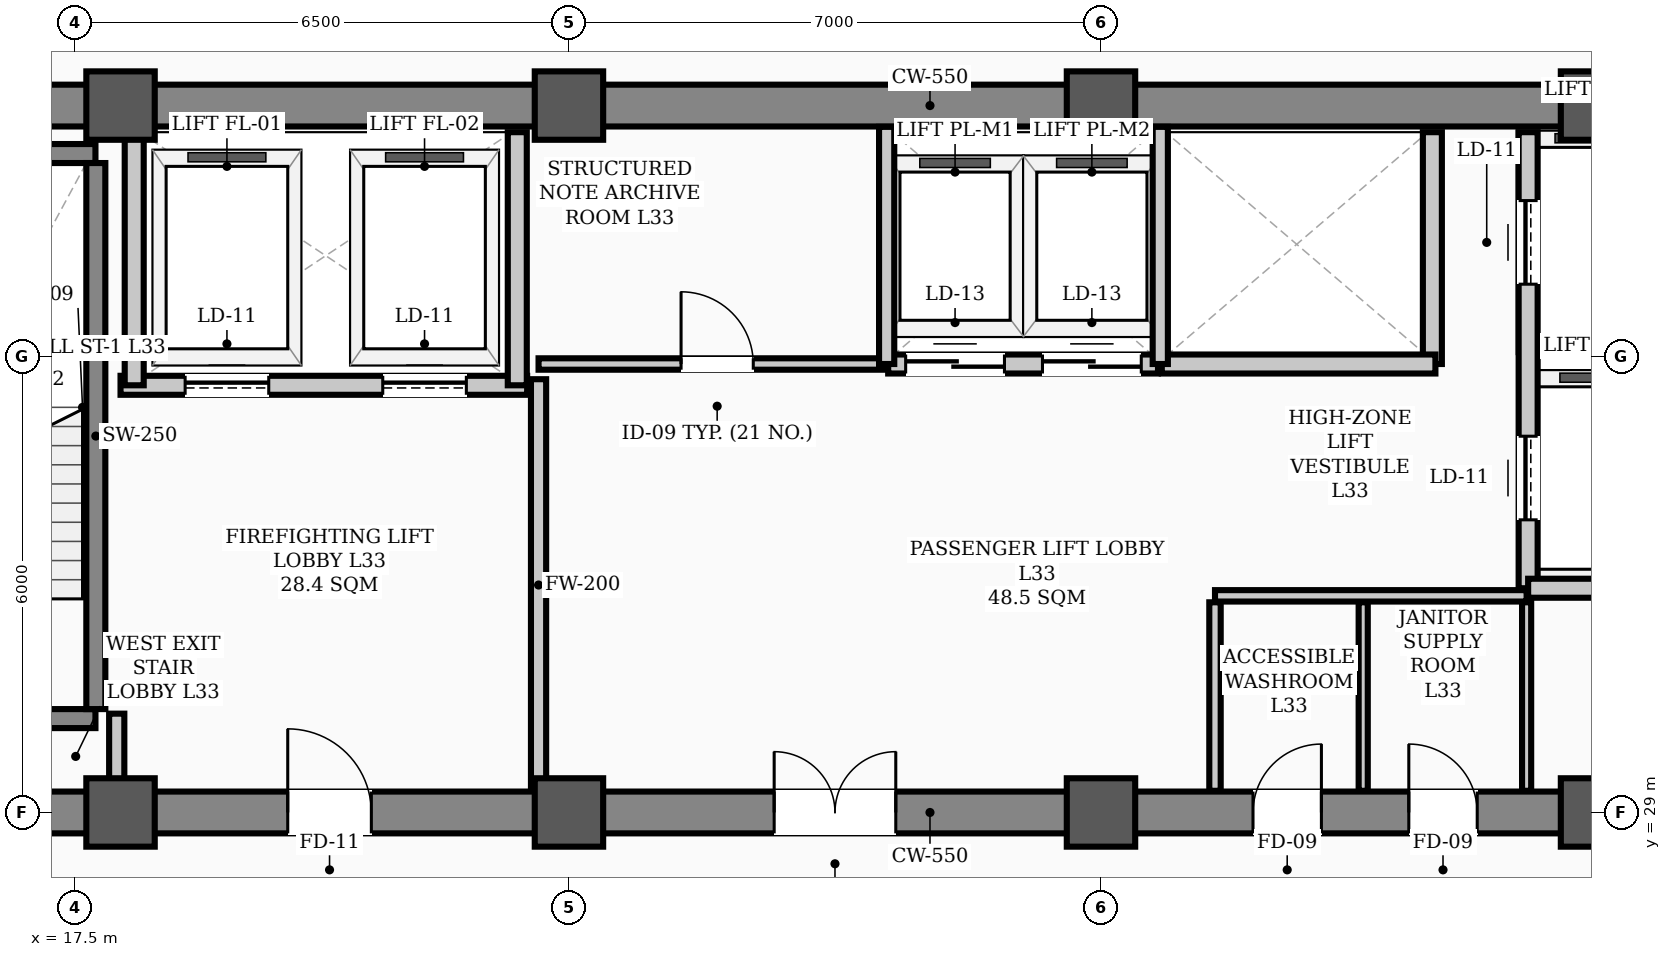
"""IFC4 building model, lengths in metres.
Left out: names, types, materials, properties, quantities, classifications, styles, units other than length and angle.
Written with IfcOpenShell. Run it as: python <this file> out.ifc"""

import sys

from ifc_helpers import new_model, si_unit, direction, frame, frame_2d, origin, origin_2d, place, context, subcontext, project, spatial, rectangle, hollow_rectangle, extrude, element, fill, save


model = new_model("IFC4")
c1 = context("Model", 3, precision=1e-05, world=origin(), true_north=direction((0.0, 1.0)))
c2 = subcontext(c1, "Body", "Model", "MODEL_VIEW")
j1 = project(units=[si_unit("LENGTHUNIT", "METRE"), si_unit("PLANEANGLEUNIT", "RADIAN")], contexts=[c1])
p1 = place(None, origin())
s1 = spatial("IfcSite", under=j1, at=p1, CompositionType="ELEMENT")
p2 = place(p1, origin())
s2 = spatial("IfcBuilding", under=s1, at=p2, CompositionType="ELEMENT")
p3 = place(p2, frame((0.0, 0.0, 134.4)))
s3 = spatial("IfcBuildingStorey", under=s2, at=p3, CompositionType="ELEMENT", Elevation=134.4)
for number, where, z_axis, x_axis in (
    (1, (18.1, 29.0, 0.0), (0.0, 0.0, 1.0), (1.0, 0.0, 0.0)),
    (2, (18.1, 38.3, 0.0), (0.0, 0.0, 1.0), (1.0, 0.0, 0.0)),
    (3, (24.0, 29.0, 0.0), (0.0, 0.0, 1.0), (1.0, 0.0, 0.0)),
    (4, (24.0, 38.3, 0.0), (0.0, 0.0, 1.0), (1.0, 0.0, 0.0)),
    (5, (31.0, 29.0, 0.0), (0.0, 0.0, 1.0), (1.0, 0.0, 0.0)),
    (6, (31.0, 38.3, 0.0), (0.0, 0.0, 1.0), (1.0, 0.0, 0.0)),
    (7, (37.5, 29.0, 0.0), (0.0, 0.0, 1.0), (1.0, 0.0, 0.0)),
    (8, (37.5, 38.3, 0.0), (0.0, 0.0, 1.0), (1.0, 0.0, 0.0)),
):
    element("IfcColumn", number, at=place(p3, frame(where, z_axis=z_axis, x_axis=x_axis)), inside=s3, PredefinedType="COLUMN", context=c2, shape_type="SweptSolid", body=[
        extrude(hollow_rectangle(XDim=0.9, YDim=0.9, WallThickness=0.035, InnerFilletRadius=0.017, OuterFilletRadius=0.052, at=origin_2d()), origin(), (0.0, 0.0, 1.0), 3.9),
    ])
p4 = place(p3, frame((13.5, 29.0, 0.0), z_axis=(0.0, 0.0, 1.0), x_axis=(1.0, 0.0, 0.0)))
e9 = element("IfcWall", 9, at=p4, inside=s3, PredefinedType="SHEAR", context=c2, shape_type="SweptSolid", body=[
    extrude(rectangle(XDim=30.5, YDim=0.55, at=frame_2d((15.25, 0.0))), origin(), (0.0, 0.0, 1.0), 3.72),
])
p5 = place(p4, frame((1.75, 0.0, 0.0)))
e10 = element("IfcOpeningElement", 10, at=p5, cuts=e9, PredefinedType="OPENING", context=c2, shape_type="SweptSolid", body=[
    extrude(rectangle(XDim=1.1, YDim=2.08, at=frame_2d((0.55, 1.04))), frame((0.0, 0.285, 0.0), z_axis=(0.0, -1.0, 0.0), x_axis=(1.0, 0.0, 0.0)), (0.0, 0.0, 1.0), 0.57),
])
p6 = place(p4, frame((26.7, 0.0, 0.0)))
e11 = element("IfcOpeningElement", 11, at=p6, cuts=e9, PredefinedType="OPENING", context=c2, shape_type="SweptSolid", body=[
    extrude(rectangle(XDim=1.1, YDim=2.08, at=frame_2d((0.55, 1.04))), frame((0.0, 0.285, 0.0), z_axis=(0.0, -1.0, 0.0), x_axis=(1.0, 0.0, 0.0)), (0.0, 0.0, 1.0), 0.57),
])
p7 = place(p4, frame((6.8, 0.0, 0.0)))
e12 = element("IfcOpeningElement", 12, at=p7, cuts=e9, PredefinedType="OPENING", context=c2, shape_type="SweptSolid", body=[
    extrude(rectangle(XDim=1.1, YDim=2.08, at=frame_2d((0.55, 1.04))), frame((0.0, 0.285, 0.0), z_axis=(0.0, -1.0, 0.0), x_axis=(1.0, 0.0, 0.0)), (0.0, 0.0, 1.0), 0.57),
])
p8 = place(p4, frame((13.2, 0.0, 0.0)))
e13 = element("IfcOpeningElement", 13, at=p8, cuts=e9, PredefinedType="OPENING", context=c2, shape_type="SweptSolid", body=[
    extrude(rectangle(XDim=1.6, YDim=2.08, at=frame_2d((0.8, 1.04))), frame((0.0, 0.285, 0.0), z_axis=(0.0, -1.0, 0.0), x_axis=(1.0, 0.0, 0.0)), (0.0, 0.0, 1.0), 0.57),
])
p9 = place(p4, frame((19.5, 0.0, 0.0)))
e14 = element("IfcOpeningElement", 14, at=p9, cuts=e9, PredefinedType="OPENING", context=c2, shape_type="SweptSolid", body=[
    extrude(rectangle(XDim=0.9, YDim=2.08, at=frame_2d((0.45, 1.04))), frame((0.0, 0.285, 0.0), z_axis=(0.0, -1.0, 0.0), x_axis=(1.0, 0.0, 0.0)), (0.0, 0.0, 1.0), 0.57),
])
p10 = place(p4, frame((21.55, 0.0, 0.0)))
e15 = element("IfcOpeningElement", 15, at=p10, cuts=e9, PredefinedType="OPENING", context=c2, shape_type="SweptSolid", body=[
    extrude(rectangle(XDim=0.9, YDim=2.08, at=frame_2d((0.45, 1.04))), frame((0.0, 0.285, 0.0), z_axis=(0.0, -1.0, 0.0), x_axis=(1.0, 0.0, 0.0)), (0.0, 0.0, 1.0), 0.57),
])
p11 = place(p3, frame((13.5, 38.3, 0.0), z_axis=(0.0, 0.0, 1.0), x_axis=(1.0, 0.0, 0.0)))
e16 = element("IfcWall", 16, at=p11, inside=s3, PredefinedType="SHEAR", context=c2, shape_type="SweptSolid", body=[
    extrude(rectangle(XDim=30.5, YDim=0.55, at=frame_2d((15.25, 0.0))), origin(), (0.0, 0.0, 1.0), 3.72),
])
p12 = place(p3, frame((14.43, 30.235, 0.0), z_axis=(0.0, 0.0, 1.0), x_axis=(1.0, 0.0, 0.0)))
e17 = element("IfcWall", 17, at=p12, inside=s3, PredefinedType="STANDARD", context=c2, shape_type="SweptSolid", body=[
    extrude(rectangle(XDim=3.34, YDim=0.25, at=frame_2d((1.67, 0.0))), origin(), (0.0, 0.0, 1.0), 3.72),
])
p13 = place(p12, frame((1.1, 0.0, 0.0)))
e18 = element("IfcOpeningElement", 18, at=p13, cuts=e17, PredefinedType="OPENING", context=c2, shape_type="SweptSolid", body=[
    extrude(rectangle(XDim=1.1, YDim=2.08, at=frame_2d((0.55, 1.04))), frame((0.0, 0.135, 0.0), z_axis=(0.0, -1.0, 0.0), x_axis=(1.0, 0.0, 0.0)), (0.0, 0.0, 1.0), 0.27),
])
p14 = place(p3, frame((14.43, 37.669, 0.0), z_axis=(0.0, 0.0, 1.0), x_axis=(1.0, 0.0, 0.0)))
e19 = element("IfcWall", 19, at=p14, inside=s3, PredefinedType="STANDARD", context=c2, shape_type="SweptSolid", body=[
    extrude(rectangle(XDim=3.34, YDim=0.25, at=frame_2d((1.67, 0.0))), origin(), (0.0, 0.0, 1.0), 3.72),
])
p15 = place(p3, frame((17.775, 30.36, 0.0), z_axis=(0.0, 0.0, 1.0), x_axis=(0.0, 1.0, 0.0)))
e20 = element("IfcWall", 20, at=p15, inside=s3, PredefinedType="STANDARD", context=c2, shape_type="SweptSolid", body=[
    extrude(rectangle(XDim=7.184, YDim=0.25, at=frame_2d((3.592, 0.0))), origin(), (0.0, 0.0, 1.0), 3.72),
])
p16 = place(p3, frame((18.1, 34.62, 0.0), z_axis=(0.0, 0.0, 1.0), x_axis=(1.0, 0.0, 0.0)))
e21 = element("IfcWall", 21, at=p16, inside=s3, PredefinedType="STANDARD", context=c2, shape_type="SweptSolid", body=[
    extrude(rectangle(XDim=5.35, YDim=0.25, at=frame_2d((2.675, 0.0))), origin(), (0.0, 0.0, 1.0), 3.72),
])
p17 = place(p16, frame((0.85, 0.0, 0.0)))
e22 = element("IfcOpeningElement", 22, at=p17, cuts=e21, PredefinedType="OPENING", context=c2, shape_type="SweptSolid", body=[
    extrude(rectangle(XDim=1.1, YDim=2.08, at=frame_2d((0.55, 1.04))), frame((0.0, 0.135, 0.0), z_axis=(0.0, -1.0, 0.0), x_axis=(1.0, 0.0, 0.0)), (0.0, 0.0, 1.0), 0.27),
])
p18 = place(p16, frame((3.45, 0.0, 0.0)))
e23 = element("IfcOpeningElement", 23, at=p18, cuts=e21, PredefinedType="OPENING", context=c2, shape_type="SweptSolid", body=[
    extrude(rectangle(XDim=1.1, YDim=2.08, at=frame_2d((0.55, 1.04))), frame((0.0, 0.135, 0.0), z_axis=(0.0, -1.0, 0.0), x_axis=(1.0, 0.0, 0.0)), (0.0, 0.0, 1.0), 0.27),
])
p19 = place(p3, frame((36.62, 31.95, 0.0), z_axis=(0.0, 0.0, 1.0), x_axis=(0.0, 1.0, 0.0)))
e24 = element("IfcWall", 24, at=p19, inside=s3, PredefinedType="STANDARD", context=c2, shape_type="SweptSolid", body=[
    extrude(rectangle(XDim=6.0, YDim=0.25, at=frame_2d((3.0, 0.0))), origin(), (0.0, 0.0, 1.0), 3.72),
])
p20 = place(p19, frame((0.9, 0.0, 0.0)))
e25 = element("IfcOpeningElement", 25, at=p20, cuts=e24, PredefinedType="OPENING", context=c2, shape_type="SweptSolid", body=[
    extrude(rectangle(XDim=1.1, YDim=2.08, at=frame_2d((0.55, 1.04))), frame((0.0, 0.135, 0.0), z_axis=(0.0, -1.0, 0.0), x_axis=(1.0, 0.0, 0.0)), (0.0, 0.0, 1.0), 0.27),
])
p21 = place(p19, frame((4.0, 0.0, 0.0)))
e26 = element("IfcOpeningElement", 26, at=p21, cuts=e24, PredefinedType="OPENING", context=c2, shape_type="SweptSolid", body=[
    extrude(rectangle(XDim=1.1, YDim=2.08, at=frame_2d((0.55, 1.04))), frame((0.0, 0.135, 0.0), z_axis=(0.0, -1.0, 0.0), x_axis=(1.0, 0.0, 0.0)), (0.0, 0.0, 1.0), 0.27),
])
p22 = place(p3, frame((36.62, 31.95, 0.0), z_axis=(0.0, 0.0, 1.0), x_axis=(1.0, 0.0, 0.0)))
e27 = element("IfcWall", 27, at=p22, inside=s3, PredefinedType="STANDARD", context=c2, shape_type="SweptSolid", body=[
    extrude(rectangle(XDim=1.9, YDim=0.25, at=frame_2d((0.95, 0.0))), origin(), (0.0, 0.0, 1.0), 3.48),
])
for number, where, z_axis, x_axis in (
    (28, (18.28, 34.62, 0.0), (0.0, 0.0, 1.0), (0.0, 1.0, 0.0)),
    (29, (23.32, 34.62, 0.0), (0.0, 0.0, 1.0), (0.0, 1.0, 0.0)),
):
    element("IfcWall", number, at=place(p3, frame(where, z_axis=z_axis, x_axis=x_axis)), inside=s3, PredefinedType="STANDARD", context=c2, shape_type="SweptSolid", body=[
        extrude(rectangle(XDim=3.33, YDim=0.25, at=frame_2d((1.665, 0.0))), origin(), (0.0, 0.0, 1.0), 3.72),
    ])
p23 = place(p3, frame((35.36, 34.9, 0.0), z_axis=(0.0, 0.0, 1.0), x_axis=(0.0, 1.0, 0.0)))
e30 = element("IfcWall", 30, at=p23, inside=s3, PredefinedType="STANDARD", context=c2, shape_type="SweptSolid", body=[
    extrude(rectangle(XDim=3.05, YDim=0.25, at=frame_2d((1.525, 0.0))), origin(), (0.0, 0.0, 1.0), 3.72),
])
p24 = place(p3, frame((28.2, 34.9, 0.0), z_axis=(0.0, 0.0, 1.0), x_axis=(1.0, 0.0, 0.0)))
e31 = element("IfcWall", 31, at=p24, inside=s3, PredefinedType="STANDARD", context=c2, shape_type="SweptSolid", body=[
    extrude(rectangle(XDim=3.55, YDim=0.25, at=frame_2d((1.775, 0.0))), origin(), (0.0, 0.0, 1.0), 3.72),
])
p25 = place(p24, frame((0.23, 0.0, 0.0)))
e32 = element("IfcOpeningElement", 32, at=p25, cuts=e31, PredefinedType="OPENING", context=c2, shape_type="SweptSolid", body=[
    extrude(rectangle(XDim=1.3, YDim=2.08, at=frame_2d((0.65, 1.04))), frame((0.0, 0.135, 0.0), z_axis=(0.0, -1.0, 0.0), x_axis=(1.0, 0.0, 0.0)), (0.0, 0.0, 1.0), 0.27),
])
p26 = place(p24, frame((2.03, 0.0, 0.0)))
e33 = element("IfcOpeningElement", 33, at=p26, cuts=e31, PredefinedType="OPENING", context=c2, shape_type="SweptSolid", body=[
    extrude(rectangle(XDim=1.3, YDim=2.08, at=frame_2d((0.65, 1.04))), frame((0.0, 0.135, 0.0), z_axis=(0.0, -1.0, 0.0), x_axis=(1.0, 0.0, 0.0)), (0.0, 0.0, 1.0), 0.27),
])
p27 = place(p3, frame((31.8, 34.9, 0.0), z_axis=(0.0, 0.0, 1.0), x_axis=(1.0, 0.0, 0.0)))
e34 = element("IfcWall", 34, at=p27, inside=s3, PredefinedType="STANDARD", context=c2, shape_type="SweptSolid", body=[
    extrude(rectangle(XDim=3.6, YDim=0.25, at=frame_2d((1.8, 0.0))), origin(), (0.0, 0.0, 1.0), 3.72),
])
p28 = place(p3, frame((23.6, 34.9, 0.0), z_axis=(0.0, 0.0, 1.0), x_axis=(1.0, 0.0, 0.0)))
e35 = element("IfcWall", 35, at=p28, inside=s3, PredefinedType="PARTITIONING", context=c2, shape_type="SweptSolid", body=[
    extrude(rectangle(XDim=4.58, YDim=0.15, at=frame_2d((2.29, 0.0))), origin(), (0.0, 0.0, 1.0), 3.72),
])
p29 = place(p28, frame((1.875, 0.0, 0.0)))
e36 = element("IfcOpeningElement", 36, at=p29, cuts=e35, PredefinedType="OPENING", context=c2, shape_type="SweptSolid", body=[
    extrude(rectangle(XDim=0.95, YDim=2.08, at=frame_2d((0.475, 1.04))), frame((0.0, 0.085, 0.0), z_axis=(0.0, -1.0, 0.0), x_axis=(1.0, 0.0, 0.0)), (0.0, 0.0, 1.0), 0.17),
])
p30 = place(p3, frame((32.5, 31.85, 0.0), z_axis=(0.0, 0.0, 1.0), x_axis=(1.0, 0.0, 0.0)))
e37 = element("IfcWall", 37, at=p30, inside=s3, PredefinedType="PARTITIONING", context=c2, shape_type="SweptSolid", body=[
    extrude(rectangle(XDim=4.1, YDim=0.15, at=frame_2d((2.05, 0.0))), origin(), (0.0, 0.0, 1.0), 3.72),
])
p31 = place(p3, frame((18.05, 29.285, 0.0), z_axis=(0.0, 0.0, 1.0), x_axis=(0.0, 1.0, 0.0)))
e38 = element("IfcWall", 38, at=p31, inside=s3, PredefinedType="STANDARD", context=c2, shape_type="SweptSolid", body=[
    extrude(rectangle(XDim=1.015, YDim=0.2, at=frame_2d((0.508, 0.0))), origin(), (0.0, 0.0, 1.0), 3.3),
])
p32 = place(p3, frame((23.6, 29.285, 0.0), z_axis=(0.0, 0.0, 1.0), x_axis=(0.0, 1.0, 0.0)))
e39 = element("IfcWall", 39, at=p32, inside=s3, PredefinedType="STANDARD", context=c2, shape_type="SweptSolid", body=[
    extrude(rectangle(XDim=5.415, YDim=0.2, at=frame_2d((2.708, 0.0))), origin(), (0.0, 0.0, 1.0), 3.1),
])
p33 = place(p3, frame((32.5, 29.285, 0.0), z_axis=(0.0, 0.0, 1.0), x_axis=(0.0, 1.0, 0.0)))
e40 = element("IfcWall", 40, at=p33, inside=s3, PredefinedType="PARTITIONING", context=c2, shape_type="SweptSolid", body=[
    extrude(rectangle(XDim=2.48, YDim=0.15, at=frame_2d((1.24, 0.0))), origin(), (0.0, 0.0, 1.0), 3.3),
])
for number, where, z_axis, x_axis in (
    (41, (36.6, 29.285, 0.0), (0.0, 0.0, 1.0), (0.0, 1.0, 0.0)),
    (42, (34.45, 29.285, 0.0), (0.0, 0.0, 1.0), (0.0, 1.0, 0.0)),
):
    element("IfcWall", number, at=place(p3, frame(where, z_axis=z_axis, x_axis=x_axis)), inside=s3, PredefinedType="PARTITIONING", context=c2, shape_type="SweptSolid", body=[
        extrude(rectangle(XDim=2.48, YDim=0.12, at=frame_2d((1.24, 0.0))), origin(), (0.0, 0.0, 1.0), 3.3),
    ])
for number, where, z_axis, x_axis in (
    (43, (28.18, 34.9, 0.0), (0.0, 0.0, 1.0), (0.0, 1.0, 0.0)),
    (44, (31.78, 34.9, 0.0), (0.0, 0.0, 1.0), (0.0, 1.0, 0.0)),
):
    element("IfcWall", number, at=place(p3, frame(where, z_axis=z_axis, x_axis=x_axis)), inside=s3, PredefinedType="STANDARD", context=c2, shape_type="SweptSolid", body=[
        extrude(rectangle(XDim=3.12, YDim=0.2, at=frame_2d((1.56, 0.0))), origin(), (0.0, 0.0, 1.0), 3.72),
    ])
p34 = place(p7, origin())
e45 = element("IfcDoor", 45, at=p34, inside=s3, OperationType="SINGLE_SWING_LEFT", PredefinedType="DOOR", context=c2, shape_type="SweptSolid", body=[
    extrude(rectangle(XDim=1.1, YDim=2.08, at=frame_2d((0.55, 1.04))), frame((0.0, 0.025, 0.0), z_axis=(0.0, -1.0, 0.0), x_axis=(1.0, 0.0, 0.0)), (0.0, 0.0, 1.0), 0.05),
])
fill(e12, e45)
p35 = place(p8, origin())
e46 = element("IfcDoor", 46, at=p35, inside=s3, OperationType="DOUBLE_DOOR_SINGLE_SWING", PredefinedType="DOOR", context=c2, shape_type="SweptSolid", body=[
    extrude(rectangle(XDim=1.6, YDim=2.08, at=frame_2d((0.8, 1.04))), frame((0.0, 0.025, 0.0), z_axis=(0.0, -1.0, 0.0), x_axis=(1.0, 0.0, 0.0)), (0.0, 0.0, 1.0), 0.05),
])
fill(e13, e46)
p36 = place(p29, origin())
e47 = element("IfcDoor", 47, at=p36, inside=s3, OperationType="SINGLE_SWING_LEFT", PredefinedType="DOOR", context=c2, shape_type="SweptSolid", body=[
    extrude(rectangle(XDim=0.95, YDim=2.08, at=frame_2d((0.475, 1.04))), frame((0.0, 0.025, 0.0), z_axis=(0.0, -1.0, 0.0), x_axis=(1.0, 0.0, 0.0)), (0.0, 0.0, 1.0), 0.05),
])
fill(e36, e47)
p37 = place(p9, origin())
e48 = element("IfcDoor", 48, at=p37, inside=s3, OperationType="SINGLE_SWING_RIGHT", PredefinedType="DOOR", context=c2, shape_type="SweptSolid", body=[
    extrude(rectangle(XDim=0.9, YDim=2.08, at=frame_2d((0.45, 1.04))), frame((0.0, 0.025, 0.0), z_axis=(0.0, -1.0, 0.0), x_axis=(1.0, 0.0, 0.0)), (0.0, 0.0, 1.0), 0.05),
])
fill(e14, e48)
p38 = place(p10, origin())
e49 = element("IfcDoor", 49, at=p38, inside=s3, OperationType="SINGLE_SWING_LEFT", PredefinedType="DOOR", context=c2, shape_type="SweptSolid", body=[
    extrude(rectangle(XDim=0.9, YDim=2.08, at=frame_2d((0.45, 1.04))), frame((0.0, 0.025, 0.0), z_axis=(0.0, -1.0, 0.0), x_axis=(1.0, 0.0, 0.0)), (0.0, 0.0, 1.0), 0.05),
])
fill(e15, e49)
p39 = place(p17, origin())
e50 = element("IfcDoor", 50, at=p39, inside=s3, OperationType="SLIDING_TO_LEFT", PredefinedType="DOOR", context=c2, shape_type="SweptSolid", body=[
    extrude(rectangle(XDim=1.1, YDim=2.08, at=frame_2d((0.55, 1.04))), frame((0.0, 0.025, 0.0), z_axis=(0.0, -1.0, 0.0), x_axis=(1.0, 0.0, 0.0)), (0.0, 0.0, 1.0), 0.05),
])
fill(e22, e50)
p40 = place(p18, origin())
e51 = element("IfcDoor", 51, at=p40, inside=s3, OperationType="SLIDING_TO_LEFT", PredefinedType="DOOR", context=c2, shape_type="SweptSolid", body=[
    extrude(rectangle(XDim=1.1, YDim=2.08, at=frame_2d((0.55, 1.04))), frame((0.0, 0.025, 0.0), z_axis=(0.0, -1.0, 0.0), x_axis=(1.0, 0.0, 0.0)), (0.0, 0.0, 1.0), 0.05),
])
fill(e23, e51)
p41 = place(p20, origin())
e52 = element("IfcDoor", 52, at=p41, inside=s3, OperationType="SLIDING_TO_LEFT", PredefinedType="DOOR", context=c2, shape_type="SweptSolid", body=[
    extrude(rectangle(XDim=1.1, YDim=2.08, at=frame_2d((0.55, 1.04))), frame((0.0, 0.025, 0.0), z_axis=(0.0, -1.0, 0.0), x_axis=(1.0, 0.0, 0.0)), (0.0, 0.0, 1.0), 0.05),
])
fill(e25, e52)
p42 = place(p21, origin())
e53 = element("IfcDoor", 53, at=p42, inside=s3, OperationType="SLIDING_TO_LEFT", PredefinedType="DOOR", context=c2, shape_type="SweptSolid", body=[
    extrude(rectangle(XDim=1.1, YDim=2.08, at=frame_2d((0.55, 1.04))), frame((0.0, 0.025, 0.0), z_axis=(0.0, -1.0, 0.0), x_axis=(1.0, 0.0, 0.0)), (0.0, 0.0, 1.0), 0.05),
])
fill(e26, e53)
p43 = place(p25, origin())
e54 = element("IfcDoor", 54, at=p43, inside=s3, OperationType="DOUBLE_DOOR_SLIDING", PredefinedType="DOOR", context=c2, shape_type="SweptSolid", body=[
    extrude(rectangle(XDim=1.3, YDim=2.08, at=frame_2d((0.65, 1.04))), frame((0.0, 0.025, 0.0), z_axis=(0.0, -1.0, 0.0), x_axis=(1.0, 0.0, 0.0)), (0.0, 0.0, 1.0), 0.05),
])
fill(e32, e54)
p44 = place(p26, origin())
e55 = element("IfcDoor", 55, at=p44, inside=s3, OperationType="DOUBLE_DOOR_SLIDING", PredefinedType="DOOR", context=c2, shape_type="SweptSolid", body=[
    extrude(rectangle(XDim=1.3, YDim=2.08, at=frame_2d((0.65, 1.04))), frame((0.0, 0.025, 0.0), z_axis=(0.0, -1.0, 0.0), x_axis=(1.0, 0.0, 0.0)), (0.0, 0.0, 1.0), 0.05),
])
fill(e33, e55)
save(model, sys.argv[1])
